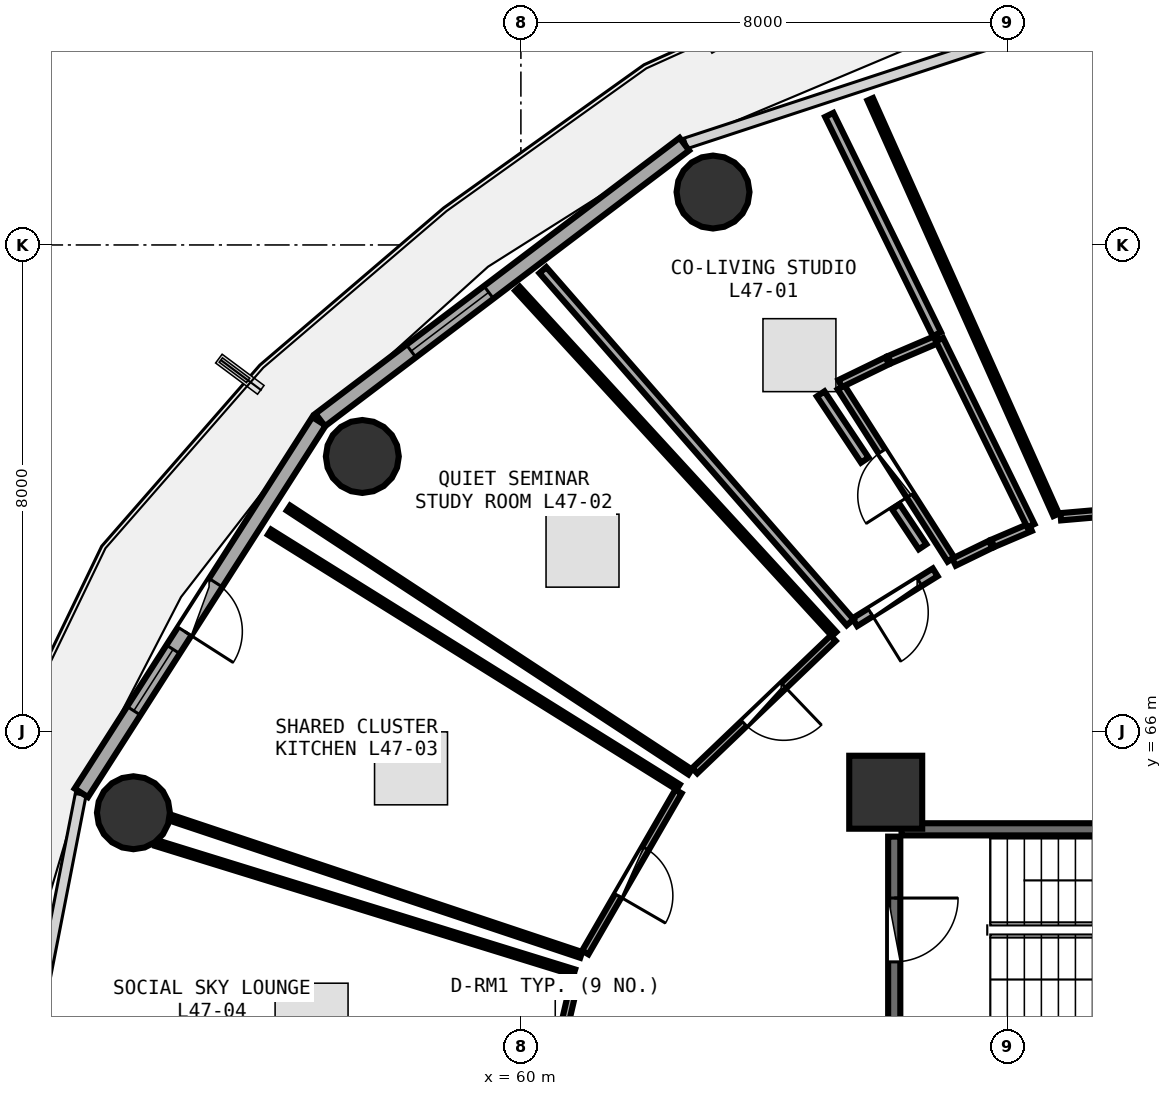
"""IFC4 building model, lengths in metres.
Left out: names, types, materials, properties, quantities, classifications, styles, units other than length and angle.
Written with IfcOpenShell. Run it as: python <this file> out.ifc"""

import sys

from ifc_helpers import new_model, si_unit, direction, frame, frame_2d, origin, origin_2d, place, context, subcontext, project, spatial, rectangle, circle, extrude, element, fill, save


model = new_model("IFC4")
c1 = context("Model", 3, precision=1e-05, world=origin(), true_north=direction((0.0, 1.0)))
c2 = subcontext(c1, "Body", "Model", "MODEL_VIEW")
j1 = project(units=[si_unit("LENGTHUNIT", "METRE"), si_unit("PLANEANGLEUNIT", "RADIAN")], contexts=[c1])
p1 = place(None, origin())
s1 = spatial("IfcSite", under=j1, at=p1, CompositionType="ELEMENT")
p2 = place(p1, origin())
s2 = spatial("IfcBuilding", under=s1, at=p2, CompositionType="ELEMENT")
p3 = place(p2, frame((0.0, 0.0, 184.35)))
s3 = spatial("IfcBuildingStorey", under=s2, at=p3, CompositionType="ELEMENT", Elevation=184.35)
p4 = place(p3, frame((66.0, 65.0, 0.0), z_axis=(0.0, 0.0, 1.0), x_axis=(1.0, 0.0, 0.0)))
e1 = element("IfcColumn", 1, at=p4, inside=s3, PredefinedType="PILASTER", context=c2, shape_type="SweptSolid", body=[
    extrude(rectangle(XDim=1.2, YDim=1.2, at=origin_2d()), origin(), (0.0, 0.0, 1.0), 4.76),
])
for number, where, z_axis, x_axis in (
    (2, (63.16, 74.87, 0.0), (0.0, 0.0, 1.0), (1.0, 0.0, 0.0)),
    (3, (57.392, 70.521, 0.0), (0.0, 0.0, 1.0), (1.0, 0.0, 0.0)),
    (4, (53.627, 64.663, 0.0), (0.0, 0.0, 1.0), (1.0, 0.0, 0.0)),
):
    element("IfcColumn", number, at=place(p3, frame(where, z_axis=z_axis, x_axis=x_axis)), inside=s3, PredefinedType="COLUMN", context=c2, shape_type="SweptSolid", body=[
        extrude(circle(Radius=0.6, at=origin_2d()), origin(), (0.0, 0.0, 1.0), 4.76),
    ])
p5 = place(p3, frame((62.688, 75.658, 0.0), z_axis=(0.0, 0.0, 1.0), x_axis=(-0.797163719609, -0.603763202042, 0.0)))
e5 = element("IfcWall", 5, at=p5, inside=s3, PredefinedType="SOLIDWALL", context=c2, shape_type="SweptSolid", body=[
    extrude(rectangle(XDim=7.512, YDim=0.26, at=frame_2d((3.756, 0.0))), origin(), (0.0, 0.0, 1.0), 4.345),
])
p6 = place(p5, frame((4.036, 0.0, 0.85)))
e6 = element("IfcOpeningElement", 6, at=p6, cuts=e5, PredefinedType="OPENING", context=c2, shape_type="SweptSolid", body=[
    extrude(rectangle(XDim=1.6, YDim=1.45, at=frame_2d((0.8, 0.725))), frame((0.0, 0.14, 0.0), z_axis=(0.0, -1.0, 0.0), x_axis=(1.0, 0.0, 0.0)), (0.0, 0.0, 1.0), 0.28),
])
p7 = place(p3, frame((56.679, 71.1, 0.0), z_axis=(0.0, 0.0, 1.0), x_axis=(-0.538801521808, -0.842432739213, 0.0)))
e7 = element("IfcWall", 7, at=p7, inside=s3, PredefinedType="SOLIDWALL", context=c2, shape_type="SweptSolid", body=[
    extrude(rectangle(XDim=7.253, YDim=0.26, at=frame_2d((3.627, 0.0))), origin(), (0.0, 0.0, 1.0), 4.345),
])
p8 = place(p7, frame((3.152, 0.0, 0.0)))
e8 = element("IfcOpeningElement", 8, at=p8, cuts=e7, PredefinedType="OPENING", context=c2, shape_type="SweptSolid", body=[
    extrude(rectangle(XDim=0.95, YDim=2.1, at=frame_2d((0.475, 1.05))), frame((0.0, 0.14, 0.0), z_axis=(0.0, -1.0, 0.0), x_axis=(1.0, 0.0, 0.0)), (0.0, 0.0, 1.0), 0.28),
])
p9 = place(p7, frame((4.452, 0.0, 0.85)))
e9 = element("IfcOpeningElement", 9, at=p9, cuts=e7, PredefinedType="OPENING", context=c2, shape_type="SweptSolid", body=[
    extrude(rectangle(XDim=1.2, YDim=1.45, at=frame_2d((0.6, 0.725))), frame((0.0, 0.14, 0.0), z_axis=(0.0, -1.0, 0.0), x_axis=(1.0, 0.0, 0.0)), (0.0, 0.0, 1.0), 0.28),
])
p10 = place(p3, frame((73.42, 64.39, 0.0), z_axis=(0.0, 0.0, 1.0), x_axis=(-1.0, 0.0, 0.0)))
e10 = element("IfcWall", 10, at=p10, inside=s3, PredefinedType="SHEAR", context=c2, shape_type="SweptSolid", body=[
    extrude(rectangle(XDim=7.16, YDim=0.2, at=frame_2d((3.58, 0.0))), origin(), (0.0, 0.0, 1.0), 4.36),
])
p11 = place(p3, frame((66.14, 64.27, 0.0), z_axis=(0.0, 0.0, 1.0), x_axis=(0.0, -1.0, 0.0)))
e11 = element("IfcWall", 11, at=p11, inside=s3, PredefinedType="SHEAR", context=c2, shape_type="SweptSolid", body=[
    extrude(rectangle(XDim=3.07, YDim=0.2, at=frame_2d((1.535, 0.0))), origin(), (0.0, 0.0, 1.0), 4.36),
])
p12 = place(p11, frame((1.01, 0.0, 0.0)))
e12 = element("IfcOpeningElement", 12, at=p12, cuts=e11, PredefinedType="OPENING", context=c2, shape_type="SweptSolid", body=[
    extrude(rectangle(XDim=1.05, YDim=2.1, at=frame_2d((0.525, 1.05))), frame((0.0, 0.11, 0.0), z_axis=(0.0, -1.0, 0.0), x_axis=(1.0, 0.0, 0.0)), (0.0, 0.0, 1.0), 0.22),
])
p13 = place(p3, frame((76.579, 70.197, 0.0), z_axis=(0.0, 0.0, 1.0), x_axis=(-0.99627488284, -0.086234319282, 0.0)))
e13 = element("IfcWall", 13, at=p13, inside=s3, PredefinedType="PARTITIONING", context=c2, shape_type="SweptSolid", body=[
    extrude(rectangle(XDim=7.729, YDim=0.12, at=frame_2d((3.865, 0.0))), origin(), (0.0, 0.0, 1.0), 2.345),
])
p14 = place(p13, frame((3.415, 0.0, 0.0)))
e14 = element("IfcOpeningElement", 14, at=p14, cuts=e13, PredefinedType="OPENING", context=c2, shape_type="SweptSolid", body=[
    extrude(rectangle(XDim=0.9, YDim=2.08, at=frame_2d((0.45, 1.04))), frame((0.0, 0.07, 0.0), z_axis=(0.0, -1.0, 0.0), x_axis=(1.0, 0.0, 0.0)), (0.0, 0.0, 1.0), 0.14),
])
p15 = place(p3, frame((67.073, 68.826, 0.0), z_axis=(0.0, 0.0, 1.0), x_axis=(-0.537814804981, 0.843063008051, 0.0)))
e15 = element("IfcWall", 15, at=p15, inside=s3, PredefinedType="PLUMBINGWALL", context=c2, shape_type="SweptSolid", body=[
    extrude(rectangle(XDim=3.362, YDim=0.13, at=frame_2d((1.681, 0.0))), origin(), (0.0, 0.0, 1.0), 4.045),
])
p16 = place(p15, frame((1.251, 0.0, 0.0)))
e16 = element("IfcOpeningElement", 16, at=p16, cuts=e15, PredefinedType="OPENING", context=c2, shape_type="SweptSolid", body=[
    extrude(rectangle(XDim=0.86, YDim=2.05, at=frame_2d((0.43, 1.025))), frame((0.0, 0.075, 0.0), z_axis=(0.0, -1.0, 0.0), x_axis=(1.0, 0.0, 0.0)), (0.0, 0.0, 1.0), 0.15),
])
p17 = place(p3, frame((66.814, 68.616, 0.0), z_axis=(0.0, 0.0, 1.0), x_axis=(-0.849572284685, -0.527472210732, 0.0)))
e17 = element("IfcWall", 17, at=p17, inside=s3, PredefinedType="PARTITIONING", context=c2, shape_type="SweptSolid", body=[
    extrude(rectangle(XDim=1.556, YDim=0.15, at=frame_2d((0.778, 0.0))), origin(), (0.0, 0.0, 1.0), 2.345),
])
p18 = place(p17, frame((0.303, 0.0, 0.0)))
e18 = element("IfcOpeningElement", 18, at=p18, cuts=e17, PredefinedType="OPENING", context=c2, shape_type="SweptSolid", body=[
    extrude(rectangle(XDim=0.95, YDim=2.08, at=frame_2d((0.475, 1.04))), frame((0.0, 0.085, 0.0), z_axis=(0.0, -1.0, 0.0), x_axis=(1.0, 0.0, 0.0)), (0.0, 0.0, 1.0), 0.17),
])
p19 = place(p3, frame((65.135, 67.531, 0.0), z_axis=(0.0, 0.0, 1.0), x_axis=(-0.722401093559, -0.691474265627, 0.0)))
e19 = element("IfcWall", 19, at=p19, inside=s3, PredefinedType="PARTITIONING", context=c2, shape_type="SweptSolid", body=[
    extrude(rectangle(XDim=3.15, YDim=0.12, at=frame_2d((1.575, 0.0))), origin(), (0.0, 0.0, 1.0), 2.345),
])
p20 = place(p19, frame((1.125, 0.0, 0.0)))
e20 = element("IfcOpeningElement", 20, at=p20, cuts=e19, PredefinedType="OPENING", context=c2, shape_type="SweptSolid", body=[
    extrude(rectangle(XDim=0.9, YDim=2.08, at=frame_2d((0.45, 1.04))), frame((0.0, 0.07, 0.0), z_axis=(0.0, -1.0, 0.0), x_axis=(1.0, 0.0, 0.0)), (0.0, 0.0, 1.0), 0.14),
])
p21 = place(p3, frame((62.591, 65.012, 0.0), z_axis=(0.0, 0.0, 1.0), x_axis=(-0.500746842293, -0.865593784598, 0.0)))
e21 = element("IfcWall", 21, at=p21, inside=s3, PredefinedType="PARTITIONING", context=c2, shape_type="SweptSolid", body=[
    extrude(rectangle(XDim=3.059, YDim=0.12, at=frame_2d((1.53, 0.0))), origin(), (0.0, 0.0, 1.0), 2.345),
])
p22 = place(p21, frame((1.08, 0.0, 0.0)))
e22 = element("IfcOpeningElement", 22, at=p22, cuts=e21, PredefinedType="OPENING", context=c2, shape_type="SweptSolid", body=[
    extrude(rectangle(XDim=0.9, YDim=2.08, at=frame_2d((0.45, 1.04))), frame((0.0, 0.07, 0.0), z_axis=(0.0, -1.0, 0.0), x_axis=(1.0, 0.0, 0.0)), (0.0, 0.0, 1.0), 0.14),
])
p23 = place(p3, frame((60.903, 61.968, 0.0), z_axis=(0.0, 0.0, 1.0), x_axis=(-0.225317744346, -0.974285335045, 0.0)))
e23 = element("IfcWall", 23, at=p23, inside=s3, PredefinedType="PARTITIONING", context=c2, shape_type="SweptSolid", body=[
    extrude(rectangle(XDim=2.996, YDim=0.12, at=frame_2d((1.498, 0.0))), origin(), (0.0, 0.0, 1.0), 4.35),
])
p24 = place(p23, frame((1.048, 0.0, 0.0)))
e24 = element("IfcOpeningElement", 24, at=p24, cuts=e23, PredefinedType="OPENING", context=c2, shape_type="SweptSolid", body=[
    extrude(rectangle(XDim=0.9, YDim=2.08, at=frame_2d((0.45, 1.04))), frame((0.0, 0.07, 0.0), z_axis=(0.0, -1.0, 0.0), x_axis=(1.0, 0.0, 0.0)), (0.0, 0.0, 1.0), 0.14),
])
p25 = place(p3, frame((68.803, 69.562, 0.0), z_axis=(0.0, 0.0, 1.0), x_axis=(-0.408373210504, 0.912815052978, 0.0)))
e25 = element("IfcWall", 25, at=p25, inside=s3, PredefinedType="PARTITIONING", context=c2, shape_type="SweptSolid", body=[
    extrude(rectangle(XDim=7.487, YDim=0.1, at=frame_2d((3.743, 0.0))), origin(), (0.0, 0.0, 1.0), 3.895),
])
p26 = place(p3, frame((68.379, 69.356, 0.0), z_axis=(0.0, 0.0, 1.0), x_axis=(-0.919951191688, -0.392032913046, 0.0)))
e26 = element("IfcWall", 26, at=p26, inside=s3, PredefinedType="PLUMBINGWALL", context=c2, shape_type="SweptSolid", body=[
    extrude(rectangle(XDim=0.672, YDim=0.13, at=frame_2d((0.336, 0.0))), origin(), (0.0, 0.0, 1.0), 4.105),
])
p27 = place(p3, frame((67.724, 69.076, 0.0), z_axis=(0.0, 0.0, 1.0), x_axis=(-0.899196253898, -0.437545537031, 0.0)))
e27 = element("IfcWall", 27, at=p27, inside=s3, PredefinedType="PLUMBINGWALL", context=c2, shape_type="SweptSolid", body=[
    extrude(rectangle(XDim=0.668, YDim=0.13, at=frame_2d((0.334, 0.0))), origin(), (0.0, 0.0, 1.0), 4.105),
])
p28 = place(p3, frame((65.25, 71.72, 0.0), z_axis=(0.0, 0.0, 1.0), x_axis=(0.899469970911, 0.43698257566, 0.0)))
e28 = element("IfcWall", 28, at=p28, inside=s3, PredefinedType="PLUMBINGWALL", context=c2, shape_type="SweptSolid", body=[
    extrude(rectangle(XDim=0.862, YDim=0.13, at=frame_2d((0.431, 0.0))), origin(), (0.0, 0.0, 1.0), 4.35),
])
p29 = place(p3, frame((66.061, 72.113, 0.0), z_axis=(0.0, 0.0, 1.0), x_axis=(0.919552803105, 0.392966464601, 0.0)))
e29 = element("IfcWall", 29, at=p29, inside=s3, PredefinedType="PLUMBINGWALL", context=c2, shape_type="SweptSolid", body=[
    extrude(rectangle(XDim=0.866, YDim=0.13, at=frame_2d((0.433, 0.0))), origin(), (0.0, 0.0, 1.0), 4.35),
])
p30 = place(p3, frame((66.885, 72.443, 0.0), z_axis=(0.0, 0.0, 1.0), x_axis=(0.440845194529, -0.897583151836, 0.0)))
e30 = element("IfcWall", 30, at=p30, inside=s3, PredefinedType="PLUMBINGWALL", context=c2, shape_type="SweptSolid", body=[
    extrude(rectangle(XDim=3.41, YDim=0.13, at=frame_2d((1.705, 0.0))), origin(), (0.0, 0.0, 1.0), 4.045),
])
p31 = place(p3, frame((65.415, 67.794, 0.0), z_axis=(0.0, 0.0, 1.0), x_axis=(-0.657449338105, 0.753498751044, 0.0)))
e31 = element("IfcWall", 31, at=p31, inside=s3, PredefinedType="PARTITIONING", context=c2, shape_type="SweptSolid", body=[
    extrude(rectangle(XDim=7.687, YDim=0.15, at=frame_2d((3.843, 0.0))), origin(), (0.0, 0.0, 1.0), 2.345),
])
p32 = place(p3, frame((65.072, 76.139, 0.0), z_axis=(0.0, 0.0, 1.0), x_axis=(0.44056455493, -0.897720932662, 0.0)))
e32 = element("IfcWall", 32, at=p32, inside=s3, PredefinedType="PARTITIONING", context=c2, shape_type="SweptSolid", body=[
    extrude(rectangle(XDim=4.017, YDim=0.15, at=frame_2d((2.009, 0.0))), origin(), (0.0, 0.0, 1.0), 3.895),
])
p33 = place(p3, frame((64.93, 71.551, 0.0), z_axis=(0.0, 0.0, 1.0), x_axis=(0.554614122057, -0.832107670686, 0.0)))
e33 = element("IfcWall", 33, at=p33, inside=s3, PredefinedType="PARTITIONING", context=c2, shape_type="SweptSolid", body=[
    extrude(rectangle(XDim=1.309, YDim=0.15, at=frame_2d((0.655, 0.0))), origin(), (0.0, 0.0, 1.0), 4.045),
])
p34 = place(p3, frame((66.167, 69.696, 0.0), z_axis=(0.0, 0.0, 1.0), x_axis=(0.554700196225, -0.832050294338, 0.0)))
e34 = element("IfcWall", 34, at=p34, inside=s3, PredefinedType="PARTITIONING", context=c2, shape_type="SweptSolid", body=[
    extrude(rectangle(XDim=0.792, YDim=0.15, at=frame_2d((0.396, 0.0))), origin(), (0.0, 0.0, 1.0), 4.35),
])
p35 = place(p3, frame((62.783, 65.334, 0.0), z_axis=(0.0, 0.0, 1.0), x_axis=(-0.835790537916, 0.549048428401, 0.0)))
e35 = element("IfcWall", 35, at=p35, inside=s3, PredefinedType="PARTITIONING", context=c2, shape_type="SweptSolid", body=[
    extrude(rectangle(XDim=7.903, YDim=0.1, at=frame_2d((3.952, 0.0))), origin(), (0.0, 0.0, 1.0), 3.895),
])
p36 = place(p3, frame((59.943, 73.281, 0.0), z_axis=(0.0, 0.0, 1.0), x_axis=(0.675932664954, -0.736963386097, 0.0)))
e36 = element("IfcWall", 36, at=p36, inside=s3, PredefinedType="PARTITIONING", context=c2, shape_type="SweptSolid", body=[
    extrude(rectangle(XDim=7.705, YDim=0.1, at=frame_2d((3.852, 0.0))), origin(), (0.0, 0.0, 1.0), 2.345),
])
p37 = place(p3, frame((60.991, 62.325, 0.0), z_axis=(0.0, 0.0, 1.0), x_axis=(-0.948483978449, 0.316825097847, 0.0)))
e37 = element("IfcWall", 37, at=p37, inside=s3, PredefinedType="PARTITIONING", context=c2, shape_type="SweptSolid", body=[
    extrude(rectangle(XDim=7.111, YDim=0.1, at=frame_2d((3.555, 0.0))), origin(), (0.0, 0.0, 1.0), 2.345),
])
p38 = place(p3, frame((55.866, 69.277, 0.0), z_axis=(0.0, 0.0, 1.0), x_axis=(0.84851390129, -0.529173090129, 0.0)))
e38 = element("IfcWall", 38, at=p38, inside=s3, PredefinedType="PARTITIONING", context=c2, shape_type="SweptSolid", body=[
    extrude(rectangle(XDim=7.921, YDim=0.1, at=frame_2d((3.96, 0.0))), origin(), (0.0, 0.0, 1.0), 2.345),
])
p39 = place(p3, frame((54.003, 64.163, 0.0), z_axis=(0.0, 0.0, 1.0), x_axis=(0.955390108929, -0.295346812679, 0.0)))
e39 = element("IfcWall", 39, at=p39, inside=s3, PredefinedType="PARTITIONING", context=c2, shape_type="SweptSolid", body=[
    extrude(rectangle(XDim=7.196, YDim=0.1, at=frame_2d((3.598, 0.0))), origin(), (0.0, 0.0, 1.0), 2.345),
])
p40 = place(p6, origin())
e40 = element("IfcWindow", 40, at=p40, inside=s3, PartitioningType="SINGLE_PANEL", PredefinedType="WINDOW", context=c2, shape_type="SweptSolid", body=[
    extrude(rectangle(XDim=1.6, YDim=1.45, at=frame_2d((0.8, 0.725))), frame((0.0, 0.03, 0.0), z_axis=(0.0, -1.0, 0.0), x_axis=(1.0, 0.0, 0.0)), (0.0, 0.0, 1.0), 0.06),
])
fill(e6, e40)
p41 = place(p8, frame((0.95, 0.0, 0.0), z_axis=(0.0, 0.0, 1.0), x_axis=(-1.0, 0.0, 0.0)))
e41 = element("IfcDoor", 41, at=p41, inside=s3, OperationType="SINGLE_SWING_LEFT", PredefinedType="DOOR", context=c2, shape_type="SweptSolid", body=[
    extrude(rectangle(XDim=0.95, YDim=2.1, at=frame_2d((0.475, 1.05))), frame((0.0, 0.025, 0.0), z_axis=(0.0, -1.0, 0.0), x_axis=(1.0, 0.0, 0.0)), (0.0, 0.0, 1.0), 0.05),
])
fill(e8, e41)
p42 = place(p9, origin())
e42 = element("IfcWindow", 42, at=p42, inside=s3, PartitioningType="SINGLE_PANEL", PredefinedType="WINDOW", context=c2, shape_type="SweptSolid", body=[
    extrude(rectangle(XDim=1.2, YDim=1.45, at=frame_2d((0.6, 0.725))), frame((0.0, 0.03, 0.0), z_axis=(0.0, -1.0, 0.0), x_axis=(1.0, 0.0, 0.0)), (0.0, 0.0, 1.0), 0.06),
])
fill(e9, e42)
p43 = place(p12, origin())
e43 = element("IfcDoor", 43, at=p43, inside=s3, OperationType="SINGLE_SWING_LEFT", PredefinedType="DOOR", context=c2, shape_type="SweptSolid", body=[
    extrude(rectangle(XDim=1.05, YDim=2.1, at=frame_2d((0.525, 1.05))), frame((0.0, 0.025, 0.0), z_axis=(0.0, -1.0, 0.0), x_axis=(1.0, 0.0, 0.0)), (0.0, 0.0, 1.0), 0.05),
])
fill(e12, e43)
p44 = place(p16, origin())
e44 = element("IfcDoor", 44, at=p44, inside=s3, OperationType="SINGLE_SWING_LEFT", PredefinedType="DOOR", context=c2, shape_type="SweptSolid", body=[
    extrude(rectangle(XDim=0.86, YDim=2.05, at=frame_2d((0.43, 1.025))), frame((0.0, 0.025, 0.0), z_axis=(0.0, -1.0, 0.0), x_axis=(1.0, 0.0, 0.0)), (0.0, 0.0, 1.0), 0.05),
])
fill(e16, e44)
p45 = place(p18, origin())
e45 = element("IfcDoor", 45, at=p45, inside=s3, OperationType="SINGLE_SWING_RIGHT", PredefinedType="DOOR", context=c2, shape_type="SweptSolid", body=[
    extrude(rectangle(XDim=0.95, YDim=2.08, at=frame_2d((0.475, 1.04))), frame((0.0, 0.025, 0.0), z_axis=(0.0, -1.0, 0.0), x_axis=(1.0, 0.0, 0.0)), (0.0, 0.0, 1.0), 0.05),
])
fill(e18, e45)
p46 = place(p20, origin())
e46 = element("IfcDoor", 46, at=p46, inside=s3, OperationType="SINGLE_SWING_LEFT", PredefinedType="DOOR", context=c2, shape_type="SweptSolid", body=[
    extrude(rectangle(XDim=0.9, YDim=2.08, at=frame_2d((0.45, 1.04))), frame((0.0, 0.025, 0.0), z_axis=(0.0, -1.0, 0.0), x_axis=(1.0, 0.0, 0.0)), (0.0, 0.0, 1.0), 0.05),
])
fill(e20, e46)
p47 = place(p22, origin())
e47 = element("IfcDoor", 47, at=p47, inside=s3, OperationType="SINGLE_SWING_RIGHT", PredefinedType="DOOR", context=c2, shape_type="SweptSolid", body=[
    extrude(rectangle(XDim=0.9, YDim=2.08, at=frame_2d((0.45, 1.04))), frame((0.0, 0.025, 0.0), z_axis=(0.0, -1.0, 0.0), x_axis=(1.0, 0.0, 0.0)), (0.0, 0.0, 1.0), 0.05),
])
fill(e22, e47)
save(model, sys.argv[1])
